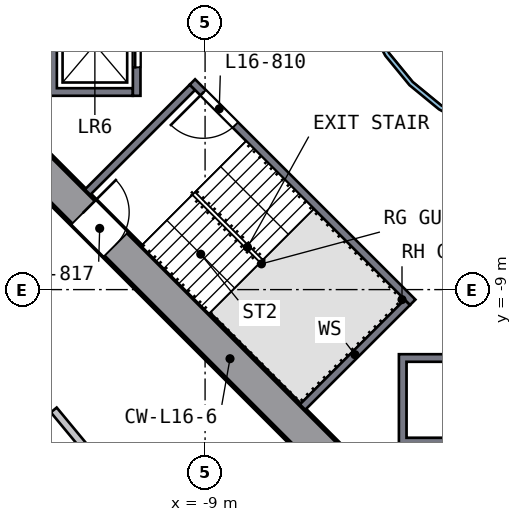
"""IFC4 building model, lengths in metres.
Left out: names, types, materials, properties, quantities, classifications, styles, units other than length and angle.
Written with IfcOpenShell. Run it as: python <this file> out.ifc"""

import sys

from ifc_helpers import new_model, si_unit, direction, frame, frame_2d, origin, place, context, subcontext, project, spatial, polyline, rectangle, outline, extrude, element, fill, save


model = new_model("IFC4")
c1 = context("Model", 3, precision=1e-05, world=origin(), true_north=direction((0.0, 1.0)))
c2 = subcontext(c1, "Body", "Model", "MODEL_VIEW")
j1 = project(units=[si_unit("LENGTHUNIT", "METRE"), si_unit("PLANEANGLEUNIT", "RADIAN")], contexts=[c1])
p1 = place(None, origin())
s1 = spatial("IfcSite", under=j1, at=p1, CompositionType="ELEMENT")
p2 = place(p1, origin())
s2 = spatial("IfcBuilding", under=s1, at=p2, CompositionType="ELEMENT")
p3 = place(p2, frame((0.0, 0.0, 71.5)))
s3 = spatial("IfcBuildingStorey", under=s2, at=p3, CompositionType="ELEMENT", Elevation=71.5)
p4 = place(p3, frame((-13.682, -5.481, 0.0), z_axis=(0.0, 0.0, 1.0), x_axis=(0.707106781, -0.707106781, 0.0)))
e1 = element("IfcWall", 1, at=p4, inside=s3, PredefinedType="SHEAR", context=c2, shape_type="SweptSolid", body=[
    extrude(rectangle(XDim=11.598, YDim=0.9, at=frame_2d((5.799, 0.0))), origin(), (0.0, 0.0, 1.0), 3.5),
])
p5 = place(p4, frame((2.099, 0.0, 0.0)))
e2 = element("IfcOpeningElement", 2, at=p5, cuts=e1, PredefinedType="OPENING", context=c2, shape_type="SweptSolid", body=[
    extrude(rectangle(XDim=1.2, YDim=2.1, at=frame_2d((0.6, 1.05))), frame((0.0, 0.46, 0.0), z_axis=(0.0, -1.0, 0.0), x_axis=(1.0, 0.0, 0.0)), (0.0, 0.0, 1.0), 0.92),
])
p6 = place(p3, origin())
e3 = element("IfcWall", 3, at=p6, inside=s3, PredefinedType="SOLIDWALL", context=c2, shape_type="SweptSolid", body=[
    extrude(outline(polyline([(-13.1, -3.9), (-13.1, -1.2), (-10.9, -1.2), (-10.9, -1.4), (-12.9, -1.4), (-12.9, -3.7), (-10.9, -3.7), (-10.9, -3.9), (-13.1, -3.9)])), origin(), (0.0, 0.0, 1.0), 3.0),
])
p7 = place(p3, frame((-10.8, -1.2, 0.0), z_axis=(0.0, 0.0, 1.0), x_axis=(0.0, -1.0, 0.0)))
e4 = element("IfcWall", 4, at=p7, inside=s3, PredefinedType="SOLIDWALL", context=c2, shape_type="SweptSolid", body=[
    extrude(rectangle(XDim=2.7, YDim=0.2, at=frame_2d((1.35, 0.0))), origin(), (0.0, 0.0, 1.0), 3.0),
])
p8 = place(p7, frame((0.75, 0.0, 0.0)))
e5 = element("IfcOpeningElement", 5, at=p8, cuts=e4, PredefinedType="OPENING", context=c2, shape_type="SweptSolid", body=[
    extrude(rectangle(XDim=1.2, YDim=2.1, at=frame_2d((0.6, 1.05))), frame((0.0, 0.11, 0.0), z_axis=(0.0, -1.0, 0.0), x_axis=(1.0, 0.0, 0.0)), (0.0, 0.0, 1.0), 0.22),
])
p9 = place(p3, origin())
e6 = element("IfcWall", 6, at=p9, inside=s3, PredefinedType="SOLIDWALL", context=c2, shape_type="SweptSolid", body=[
    extrude(outline(polyline([(-1.2, -13.1), (-3.9, -13.1), (-3.9, -10.7), (-1.2, -10.7), (-1.2, -13.1)]), holes=[polyline([(-3.7, -10.9), (-3.7, -12.9), (-1.4, -12.9), (-1.4, -10.9), (-3.7, -10.9)])]), origin(), (0.0, 0.0, 1.0), 3.0),
])
p10 = place(p3, frame((-3.535, -9.334, 0.0), z_axis=(0.0, 0.0, 1.0), x_axis=(-0.707106781, 0.707106781, 0.0)))
e7 = element("IfcWall", 7, at=p10, inside=s3, PredefinedType="SOLIDWALL", context=c2, shape_type="SweptSolid", body=[
    extrude(rectangle(XDim=8.2, YDim=0.2, at=frame_2d((4.1, 0.0))), origin(), (0.0, 0.0, 1.0), 3.0),
])
p11 = place(p10, frame((6.6, 0.0, 0.0)))
e8 = element("IfcOpeningElement", 8, at=p11, cuts=e7, PredefinedType="OPENING", context=c2, shape_type="SweptSolid", body=[
    extrude(rectangle(XDim=1.2, YDim=2.1, at=frame_2d((0.6, 1.05))), frame((0.0, 0.11, 0.0), z_axis=(0.0, -1.0, 0.0), x_axis=(1.0, 0.0, 0.0)), (0.0, 0.0, 1.0), 0.22),
])
for number, where, z_axis, x_axis in (
    (9, (-9.334, -3.677, 0.0), (0.0, 0.0, 1.0), (-0.707, -0.707, 0.0)),
    (10, (-3.677, -9.334, 0.0), (0.0, 0.0, 1.0), (-0.707, -0.707, 0.0)),
):
    element("IfcWall", number, at=place(p3, frame(where, z_axis=z_axis, x_axis=x_axis)), inside=s3, PredefinedType="SOLIDWALL", context=c2, shape_type="SweptSolid", body=[
        extrude(rectangle(XDim=3.9, YDim=0.2, at=frame_2d((1.95, 0.0))), origin(), (0.0, 0.0, 1.0), 3.0),
    ])
p12 = place(p3, origin())
e11 = element("IfcWall", 11, at=p12, inside=s3, PredefinedType="SOLIDWALL", context=c2, shape_type="SweptSolid", body=[
    extrude(outline(polyline([(5.021, -0.999), (4.73, -1.959), (4.257, -2.844), (3.62, -3.62), (2.844, -4.257), (1.959, -4.73), (0.999, -5.021), (0.0, -5.12), (-0.999, -5.021), (-1.959, -4.73), (-2.844, -4.257), (-3.62, -3.62), (-4.257, -2.844), (-4.73, -1.959), (-5.021, -0.999), (-5.12, 0.0), (-5.021, 0.999), (-4.73, 1.959), (-4.257, 2.844), (-3.62, 3.62), (-2.844, 4.257), (-1.959, 4.73), (-0.999, 5.021), (0.0, 5.12), (0.999, 5.021), (1.959, 4.73), (2.844, 4.257), (3.62, 3.62), (4.257, 2.844), (4.73, 1.959), (5.021, 0.999), (5.12, 0.0), (5.021, -0.999)]), holes=[polyline([(4.904, 0.976), (4.619, 1.913), (4.157, 2.778), (3.535, 3.535), (2.778, 4.157), (1.913, 4.619), (0.976, 4.904), (0.0, 5.0), (-0.976, 4.904), (-1.913, 4.619), (-2.778, 4.157), (-3.535, 3.535), (-4.157, 2.778), (-4.619, 1.913), (-4.904, 0.976), (-5.0, 0.0), (-4.904, -0.976), (-4.619, -1.913), (-4.157, -2.778), (-3.535, -3.535), (-2.778, -4.157), (-1.913, -4.619), (-0.976, -4.904), (0.0, -5.0), (0.976, -4.904), (1.913, -4.619), (2.778, -4.157), (3.535, -3.535), (4.157, -2.778), (4.619, -1.913), (4.904, -0.976), (5.0, 0.0), (4.904, 0.976)])]), origin(), (0.0, 0.0, 1.0), 3.0),
])
p13 = place(p3, frame((-12.982, -12.167, 0.0), z_axis=(0.0, 0.0, 1.0), x_axis=(0.637397216, -0.770535391, 0.0)))
e12 = element("IfcWall", 12, at=p13, inside=s3, PredefinedType="SOLIDWALL", context=c2, shape_type="SweptSolid", body=[
    extrude(rectangle(XDim=3.4, YDim=0.2, at=frame_2d((1.7, 0.0))), origin(), (0.0, 0.0, 1.0), 3.0),
])
p14 = place(p8, origin())
e13 = element("IfcDoor", 13, at=p14, inside=s3, OperationType="DOUBLE_DOOR_SLIDING", PredefinedType="DOOR", context=c2, shape_type="SweptSolid", body=[
    extrude(rectangle(XDim=1.2, YDim=2.1, at=frame_2d((0.6, 1.05))), frame((0.0, 0.025, 0.0), z_axis=(0.0, -1.0, 0.0), x_axis=(1.0, 0.0, 0.0)), (0.0, 0.0, 1.0), 0.05),
])
fill(e5, e13)
p15 = place(p11, origin())
e14 = element("IfcDoor", 14, at=p15, inside=s3, OperationType="SINGLE_SWING_RIGHT", PredefinedType="DOOR", context=c2, shape_type="SweptSolid", body=[
    extrude(rectangle(XDim=1.2, YDim=2.1, at=frame_2d((0.6, 1.05))), frame((0.0, 0.025, 0.0), z_axis=(0.0, -1.0, 0.0), x_axis=(1.0, 0.0, 0.0)), (0.0, 0.0, 1.0), 0.05),
])
fill(e8, e14)
p16 = place(p5, origin())
e15 = element("IfcDoor", 15, at=p16, inside=s3, OperationType="SINGLE_SWING_LEFT", PredefinedType="DOOR", context=c2, shape_type="SweptSolid", body=[
    extrude(rectangle(XDim=1.2, YDim=2.1, at=frame_2d((0.6, 1.05))), frame((0.0, 0.025, 0.0), z_axis=(0.0, -1.0, 0.0), x_axis=(1.0, 0.0, 0.0)), (0.0, 0.0, 1.0), 0.05),
])
fill(e2, e15)
save(model, sys.argv[1])
